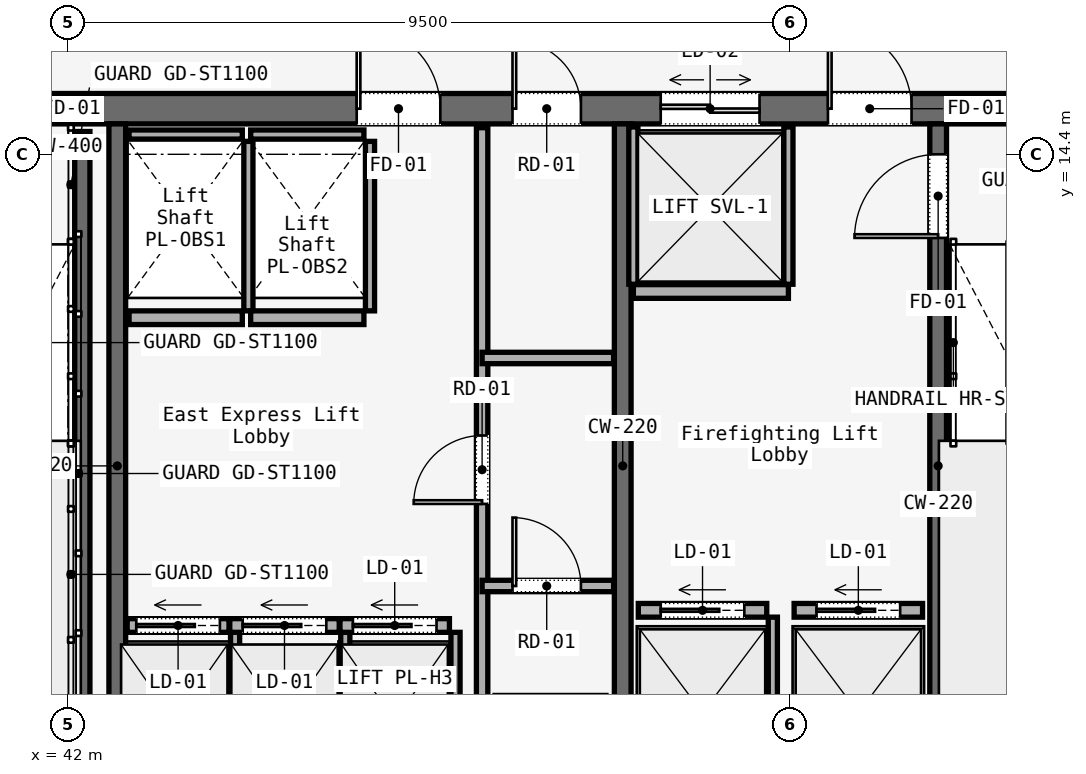
"""IFC4 building model, lengths in metres.
Left out: names, types, materials, properties, quantities, classifications, styles, units other than length and angle.
Written with IfcOpenShell. Run it as: python <this file> out.ifc"""

import sys

from ifc_helpers import new_model, si_unit, direction, frame, frame_2d, origin, place, context, subcontext, project, spatial, rectangle, extrude, element, fill, save


model = new_model("IFC4")
c1 = context("Model", 3, precision=1e-05, world=origin(), true_north=direction((0.0, 1.0)))
c2 = subcontext(c1, "Body", "Model", "MODEL_VIEW")
j1 = project(units=[si_unit("LENGTHUNIT", "METRE"), si_unit("PLANEANGLEUNIT", "RADIAN")], contexts=[c1])
p1 = place(None, origin())
s1 = spatial("IfcSite", under=j1, at=p1, CompositionType="ELEMENT")
p2 = place(p1, origin())
s2 = spatial("IfcBuilding", under=s1, at=p2, CompositionType="ELEMENT")
p3 = place(p2, frame((0.0, 0.0, 290.9)))
s3 = spatial("IfcBuildingStorey", under=s2, at=p3, CompositionType="ELEMENT", Elevation=290.9)
p4 = place(p3, frame((26.45, 15.0, 0.0), z_axis=(0.0, 0.0, 1.0), x_axis=(1.0, 0.0, 0.0)))
e1 = element("IfcWall", 1, at=p4, inside=s3, PredefinedType="SOLIDWALL", context=c2, shape_type="SweptSolid", body=[
    extrude(rectangle(XDim=31.1, YDim=0.4, at=frame_2d((15.55, 0.0))), origin(), (0.0, 0.0, 1.0), 3.58),
])
p5 = place(p4, frame((1.65, 0.0, 0.0)))
e2 = element("IfcOpeningElement", 2, at=p5, cuts=e1, PredefinedType="OPENING", context=c2, shape_type="SweptSolid", body=[
    extrude(rectangle(XDim=1.1, YDim=2.2, at=frame_2d((0.55, 1.1))), frame((0.0, 0.2, 0.0), z_axis=(0.0, -1.0, 0.0), x_axis=(1.0, 0.0, 0.0)), (0.0, 0.0, 1.0), 0.4),
])
p6 = place(p4, frame((13.65, 0.0, 0.0)))
e3 = element("IfcOpeningElement", 3, at=p6, cuts=e1, PredefinedType="OPENING", context=c2, shape_type="SweptSolid", body=[
    extrude(rectangle(XDim=1.1, YDim=2.2, at=frame_2d((0.55, 1.1))), frame((0.0, 0.2, 0.0), z_axis=(0.0, -1.0, 0.0), x_axis=(1.0, 0.0, 0.0)), (0.0, 0.0, 1.0), 0.4),
])
p7 = place(p4, frame((25.55, 0.0, 0.0)))
e4 = element("IfcOpeningElement", 4, at=p7, cuts=e1, PredefinedType="OPENING", context=c2, shape_type="SweptSolid", body=[
    extrude(rectangle(XDim=1.1, YDim=2.2, at=frame_2d((0.55, 1.1))), frame((0.0, 0.2, 0.0), z_axis=(0.0, -1.0, 0.0), x_axis=(1.0, 0.0, 0.0)), (0.0, 0.0, 1.0), 0.4),
])
p8 = place(p4, frame((19.35, 0.0, 0.0)))
e5 = element("IfcOpeningElement", 5, at=p8, cuts=e1, PredefinedType="OPENING", context=c2, shape_type="SweptSolid", body=[
    extrude(rectangle(XDim=1.1, YDim=2.2, at=frame_2d((0.55, 1.1))), frame((0.0, 0.2, 0.0), z_axis=(0.0, -1.0, 0.0), x_axis=(1.0, 0.0, 0.0)), (0.0, 0.0, 1.0), 0.4),
])
p9 = place(p4, frame((21.4, 0.0, 0.0)))
e6 = element("IfcOpeningElement", 6, at=p9, cuts=e1, PredefinedType="OPENING", context=c2, shape_type="SweptSolid", body=[
    extrude(rectangle(XDim=0.9, YDim=2.1, at=frame_2d((0.45, 1.05))), frame((0.0, 0.2, 0.0), z_axis=(0.0, -1.0, 0.0), x_axis=(1.0, 0.0, 0.0)), (0.0, 0.0, 1.0), 0.4),
])
p10 = place(p4, frame((5.54, 0.0, 0.0)))
e7 = element("IfcOpeningElement", 7, at=p10, cuts=e1, PredefinedType="OPENING", context=c2, shape_type="SweptSolid", body=[
    extrude(rectangle(XDim=0.95, YDim=2.2, at=frame_2d((0.475, 1.1))), frame((0.0, 0.2, 0.0), z_axis=(0.0, -1.0, 0.0), x_axis=(1.0, 0.0, 0.0)), (0.0, 0.0, 1.0), 0.4),
])
p11 = place(p4, frame((9.49, 0.0, 0.0)))
e8 = element("IfcOpeningElement", 8, at=p11, cuts=e1, PredefinedType="OPENING", context=c2, shape_type="SweptSolid", body=[
    extrude(rectangle(XDim=0.95, YDim=2.2, at=frame_2d((0.475, 1.1))), frame((0.0, 0.2, 0.0), z_axis=(0.0, -1.0, 0.0), x_axis=(1.0, 0.0, 0.0)), (0.0, 0.0, 1.0), 0.4),
])
p12 = place(p4, frame((23.35, 0.0, 0.0)))
e9 = element("IfcOpeningElement", 9, at=p12, cuts=e1, PredefinedType="OPENING", context=c2, shape_type="SweptSolid", body=[
    extrude(rectangle(XDim=1.3, YDim=2.3, at=frame_2d((0.65, 1.15))), frame((0.0, 0.2, 0.0), z_axis=(0.0, -1.0, 0.0), x_axis=(1.0, 0.0, 0.0)), (0.0, 0.0, 1.0), 0.4),
])
for number, where, z_axis, x_axis in (
    (10, (42.65, 5.8, 0.0), (0.0, 0.0, 1.0), (0.0, 1.0, 0.0)),
    (11, (49.3, 5.8, 0.0), (0.0, 0.0, 1.0), (0.0, 1.0, 0.0)),
):
    element("IfcWall", number, at=place(p3, frame(where, z_axis=z_axis, x_axis=x_axis)), inside=s3, PredefinedType="SOLIDWALL", context=c2, shape_type="SweptSolid", body=[
        extrude(rectangle(XDim=9.0, YDim=0.22, at=frame_2d((4.5, 0.0))), origin(), (0.0, 0.0, 1.0), 3.58),
    ])
p13 = place(p3, frame((53.45, 5.8, 0.0), z_axis=(0.0, 0.0, 1.0), x_axis=(0.0, 1.0, 0.0)))
e12 = element("IfcWall", 12, at=p13, inside=s3, PredefinedType="SOLIDWALL", context=c2, shape_type="SweptSolid", body=[
    extrude(rectangle(XDim=9.0, YDim=0.22, at=frame_2d((4.5, 0.0))), origin(), (0.0, 0.0, 1.0), 3.58),
])
p14 = place(p13, frame((7.5, 0.0, 0.0)))
e13 = element("IfcOpeningElement", 13, at=p14, cuts=e12, PredefinedType="OPENING", context=c2, shape_type="SweptSolid", body=[
    extrude(rectangle(XDim=1.1, YDim=2.2, at=frame_2d((0.55, 1.1))), frame((0.0, 0.11, 0.0), z_axis=(0.0, -1.0, 0.0), x_axis=(1.0, 0.0, 0.0)), (0.0, 0.0, 1.0), 0.22),
])
p15 = place(p3, frame((42.19, 14.7, 0.0), z_axis=(0.0, 0.0, 1.0), x_axis=(0.0, -1.0, 0.0)))
e14 = element("IfcWall", 14, at=p15, inside=s3, PredefinedType="SOLIDWALL", context=c2, shape_type="SweptSolid", body=[
    extrude(rectangle(XDim=7.65, YDim=0.2, at=frame_2d((3.825, 0.0))), origin(), (0.0, 0.0, 1.0), 3.8),
])
p16 = place(p3, frame((47.45, 5.9, 0.0), z_axis=(0.0, 0.0, 1.0), x_axis=(0.0, 1.0, 0.0)))
e15 = element("IfcWall", 15, at=p16, inside=s3, PredefinedType="PARTITIONING", context=c2, shape_type="SweptSolid", body=[
    extrude(rectangle(XDim=8.85, YDim=0.15, at=frame_2d((4.425, 0.0))), origin(), (0.0, 0.0, 1.0), 3.01),
])
p17 = place(p16, frame((3.9, 0.0, 0.0)))
e16 = element("IfcOpeningElement", 16, at=p17, cuts=e15, PredefinedType="OPENING", context=c2, shape_type="SweptSolid", body=[
    extrude(rectangle(XDim=0.9, YDim=2.1, at=frame_2d((0.45, 1.05))), frame((0.0, 0.075, 0.0), z_axis=(0.0, -1.0, 0.0), x_axis=(1.0, 0.0, 0.0)), (0.0, 0.0, 1.0), 0.15),
])
p18 = place(p3, frame((47.45, 8.72, 0.0), z_axis=(0.0, 0.0, 1.0), x_axis=(1.0, 0.0, 0.0)))
e17 = element("IfcWall", 17, at=p18, inside=s3, PredefinedType="PARTITIONING", context=c2, shape_type="SweptSolid", body=[
    extrude(rectangle(XDim=1.73, YDim=0.15, at=frame_2d((0.865, 0.0))), origin(), (0.0, 0.0, 1.0), 3.01),
])
p19 = place(p18, frame((0.4, 0.0, 0.0)))
e18 = element("IfcOpeningElement", 18, at=p19, cuts=e17, PredefinedType="OPENING", context=c2, shape_type="SweptSolid", body=[
    extrude(rectangle(XDim=0.9, YDim=2.1, at=frame_2d((0.45, 1.05))), frame((0.0, 0.075, 0.0), z_axis=(0.0, -1.0, 0.0), x_axis=(1.0, 0.0, 0.0)), (0.0, 0.0, 1.0), 0.15),
])
p20 = place(p3, frame((47.45, 11.72, 0.0), z_axis=(0.0, 0.0, 1.0), x_axis=(1.0, 0.0, 0.0)))
e19 = element("IfcWall", 19, at=p20, inside=s3, PredefinedType="PARTITIONING", context=c2, shape_type="SweptSolid", body=[
    extrude(rectangle(XDim=1.73, YDim=0.15, at=frame_2d((0.865, 0.0))), origin(), (0.0, 0.0, 1.0), 3.01),
])
p21 = place(p3, frame((42.78, 8.2, 0.0), z_axis=(0.0, 0.0, 1.0), x_axis=(1.0, 0.0, 0.0)))
e20 = element("IfcWall", 20, at=p21, inside=s3, PredefinedType="SOLIDWALL", context=c2, shape_type="SweptSolid", body=[
    extrude(rectangle(XDim=1.34, YDim=0.18, at=frame_2d((0.67, 0.0))), origin(), (0.0, 0.0, 1.0), 3.01),
])
p22 = place(p21, frame((0.12, 0.0, 0.0)))
e21 = element("IfcOpeningElement", 21, at=p22, cuts=e20, PredefinedType="OPENING", context=c2, shape_type="SweptSolid", body=[
    extrude(rectangle(XDim=1.1, YDim=2.2, at=frame_2d((0.55, 1.1))), frame((0.0, 0.09, 0.0), z_axis=(0.0, -1.0, 0.0), x_axis=(1.0, 0.0, 0.0)), (0.0, 0.0, 1.0), 0.18),
])
p23 = place(p3, frame((44.2, 5.93, 0.0), z_axis=(0.0, 0.0, 1.0), x_axis=(0.0, 1.0, 0.0)))
e22 = element("IfcWall", 22, at=p23, inside=s3, PredefinedType="SOLIDWALL", context=c2, shape_type="SweptSolid", body=[
    extrude(rectangle(XDim=2.18, YDim=0.12, at=frame_2d((1.09, 0.0))), origin(), (0.0, 0.0, 1.0), 3.01),
])
p24 = place(p3, frame((44.13, 8.2, 0.0), z_axis=(0.0, 0.0, 1.0), x_axis=(1.0, 0.0, 0.0)))
e23 = element("IfcWall", 23, at=p24, inside=s3, PredefinedType="SOLIDWALL", context=c2, shape_type="SweptSolid", body=[
    extrude(rectangle(XDim=1.44, YDim=0.18, at=frame_2d((0.72, 0.0))), origin(), (0.0, 0.0, 1.0), 3.01),
])
p25 = place(p24, frame((0.17, 0.0, 0.0)))
e24 = element("IfcOpeningElement", 24, at=p25, cuts=e23, PredefinedType="OPENING", context=c2, shape_type="SweptSolid", body=[
    extrude(rectangle(XDim=1.1, YDim=2.2, at=frame_2d((0.55, 1.1))), frame((0.0, 0.09, 0.0), z_axis=(0.0, -1.0, 0.0), x_axis=(1.0, 0.0, 0.0)), (0.0, 0.0, 1.0), 0.18),
])
p26 = place(p3, frame((45.65, 5.93, 0.0), z_axis=(0.0, 0.0, 1.0), x_axis=(0.0, 1.0, 0.0)))
e25 = element("IfcWall", 25, at=p26, inside=s3, PredefinedType="SOLIDWALL", context=c2, shape_type="SweptSolid", body=[
    extrude(rectangle(XDim=2.18, YDim=0.12, at=frame_2d((1.09, 0.0))), origin(), (0.0, 0.0, 1.0), 3.01),
])
p27 = place(p3, frame((45.58, 8.2, 0.0), z_axis=(0.0, 0.0, 1.0), x_axis=(1.0, 0.0, 0.0)))
e26 = element("IfcWall", 26, at=p27, inside=s3, PredefinedType="SOLIDWALL", context=c2, shape_type="SweptSolid", body=[
    extrude(rectangle(XDim=1.44, YDim=0.18, at=frame_2d((0.72, 0.0))), origin(), (0.0, 0.0, 1.0), 3.01),
])
p28 = place(p27, frame((0.17, 0.0, 0.0)))
e27 = element("IfcOpeningElement", 27, at=p28, cuts=e26, PredefinedType="OPENING", context=c2, shape_type="SweptSolid", body=[
    extrude(rectangle(XDim=1.1, YDim=2.2, at=frame_2d((0.55, 1.1))), frame((0.0, 0.09, 0.0), z_axis=(0.0, -1.0, 0.0), x_axis=(1.0, 0.0, 0.0)), (0.0, 0.0, 1.0), 0.18),
])
p29 = place(p3, frame((47.1, 5.93, 0.0), z_axis=(0.0, 0.0, 1.0), x_axis=(0.0, 1.0, 0.0)))
e28 = element("IfcWall", 28, at=p29, inside=s3, PredefinedType="SOLIDWALL", context=c2, shape_type="SweptSolid", body=[
    extrude(rectangle(XDim=2.18, YDim=0.12, at=frame_2d((1.09, 0.0))), origin(), (0.0, 0.0, 1.0), 3.01),
])
p30 = place(p3, frame((42.805, 12.25, 0.0), z_axis=(0.0, 0.0, 1.0), x_axis=(1.0, 0.0, 0.0)))
e29 = element("IfcWall", 29, at=p30, inside=s3, PredefinedType="SOLIDWALL", context=c2, shape_type="SweptSolid", body=[
    extrude(rectangle(XDim=1.49, YDim=0.18, at=frame_2d((0.745, 0.0))), origin(), (0.0, 0.0, 1.0), 3.01),
])
p31 = place(p3, frame((42.805, 14.66, 0.0), z_axis=(0.0, 0.0, 1.0), x_axis=(1.0, 0.0, 0.0)))
e30 = element("IfcWall", 30, at=p31, inside=s3, PredefinedType="SOLIDWALL", context=c2, shape_type="SweptSolid", body=[
    extrude(rectangle(XDim=1.49, YDim=0.12, at=frame_2d((0.745, 0.0))), origin(), (0.0, 0.0, 1.0), 3.01),
])
p32 = place(p3, frame((44.375, 12.34, 0.0), z_axis=(0.0, 0.0, 1.0), x_axis=(0.0, 1.0, 0.0)))
e31 = element("IfcWall", 31, at=p32, inside=s3, PredefinedType="SOLIDWALL", context=c2, shape_type="SweptSolid", body=[
    extrude(rectangle(XDim=2.23, YDim=0.12, at=frame_2d((1.115, 0.0))), origin(), (0.0, 0.0, 1.0), 3.01),
])
p33 = place(p3, frame((44.405, 12.25, 0.0), z_axis=(0.0, 0.0, 1.0), x_axis=(1.0, 0.0, 0.0)))
e32 = element("IfcWall", 32, at=p33, inside=s3, PredefinedType="SOLIDWALL", context=c2, shape_type="SweptSolid", body=[
    extrude(rectangle(XDim=1.49, YDim=0.18, at=frame_2d((0.745, 0.0))), origin(), (0.0, 0.0, 1.0), 3.01),
])
p34 = place(p3, frame((44.405, 14.66, 0.0), z_axis=(0.0, 0.0, 1.0), x_axis=(1.0, 0.0, 0.0)))
e33 = element("IfcWall", 33, at=p34, inside=s3, PredefinedType="SOLIDWALL", context=c2, shape_type="SweptSolid", body=[
    extrude(rectangle(XDim=1.49, YDim=0.12, at=frame_2d((0.745, 0.0))), origin(), (0.0, 0.0, 1.0), 3.01),
])
p35 = place(p3, frame((45.975, 12.34, 0.0), z_axis=(0.0, 0.0, 1.0), x_axis=(0.0, 1.0, 0.0)))
e34 = element("IfcWall", 34, at=p35, inside=s3, PredefinedType="SOLIDWALL", context=c2, shape_type="SweptSolid", body=[
    extrude(rectangle(XDim=2.23, YDim=0.12, at=frame_2d((1.115, 0.0))), origin(), (0.0, 0.0, 1.0), 3.01),
])
p36 = place(p3, frame((49.505, 8.4, 0.0), z_axis=(0.0, 0.0, 1.0), x_axis=(1.0, 0.0, 0.0)))
e35 = element("IfcWall", 35, at=p36, inside=s3, PredefinedType="SOLIDWALL", context=c2, shape_type="SweptSolid", body=[
    extrude(rectangle(XDim=1.69, YDim=0.18, at=frame_2d((0.845, 0.0))), origin(), (0.0, 0.0, 1.0), 3.01),
])
p37 = place(p36, frame((0.295, 0.0, 0.0)))
e36 = element("IfcOpeningElement", 36, at=p37, cuts=e35, PredefinedType="OPENING", context=c2, shape_type="SweptSolid", body=[
    extrude(rectangle(XDim=1.1, YDim=2.2, at=frame_2d((0.55, 1.1))), frame((0.0, 0.09, 0.0), z_axis=(0.0, -1.0, 0.0), x_axis=(1.0, 0.0, 0.0)), (0.0, 0.0, 1.0), 0.18),
])
p38 = place(p3, frame((51.275, 5.93, 0.0), z_axis=(0.0, 0.0, 1.0), x_axis=(0.0, 1.0, 0.0)))
e37 = element("IfcWall", 37, at=p38, inside=s3, PredefinedType="SOLIDWALL", context=c2, shape_type="SweptSolid", body=[
    extrude(rectangle(XDim=2.38, YDim=0.12, at=frame_2d((1.19, 0.0))), origin(), (0.0, 0.0, 1.0), 3.01),
])
p39 = place(p3, frame((51.555, 8.4, 0.0), z_axis=(0.0, 0.0, 1.0), x_axis=(1.0, 0.0, 0.0)))
e38 = element("IfcWall", 38, at=p39, inside=s3, PredefinedType="SOLIDWALL", context=c2, shape_type="SweptSolid", body=[
    extrude(rectangle(XDim=1.69, YDim=0.18, at=frame_2d((0.845, 0.0))), origin(), (0.0, 0.0, 1.0), 3.01),
])
p40 = place(p39, frame((0.295, 0.0, 0.0)))
e39 = element("IfcOpeningElement", 39, at=p40, cuts=e38, PredefinedType="OPENING", context=c2, shape_type="SweptSolid", body=[
    extrude(rectangle(XDim=1.1, YDim=2.2, at=frame_2d((0.55, 1.1))), frame((0.0, 0.09, 0.0), z_axis=(0.0, -1.0, 0.0), x_axis=(1.0, 0.0, 0.0)), (0.0, 0.0, 1.0), 0.18),
])
p41 = place(p3, frame((49.44, 12.595, 0.0), z_axis=(0.0, 0.0, 1.0), x_axis=(1.0, 0.0, 0.0)))
e40 = element("IfcWall", 40, at=p41, inside=s3, PredefinedType="SOLIDWALL", context=c2, shape_type="SweptSolid", body=[
    extrude(rectangle(XDim=2.04, YDim=0.18, at=frame_2d((1.02, 0.0))), origin(), (0.0, 0.0, 1.0), 3.01),
])
for number, where, z_axis, x_axis in (
    (41, (49.44, 12.69, 0.0), (0.0, 0.0, 1.0), (0.0, 1.0, 0.0)),
    (42, (51.48, 12.69, 0.0), (0.0, 0.0, 1.0), (0.0, 1.0, 0.0)),
):
    element("IfcWall", number, at=place(p3, frame(where, z_axis=z_axis, x_axis=x_axis)), inside=s3, PredefinedType="SOLIDWALL", context=c2, shape_type="SweptSolid", body=[
        extrude(rectangle(XDim=2.07, YDim=0.12, at=frame_2d((1.035, 0.0))), origin(), (0.0, 0.0, 1.0), 3.01),
    ])
p42 = place(p7, origin())
e43 = element("IfcDoor", 43, at=p42, inside=s3, OperationType="SINGLE_SWING_RIGHT", PredefinedType="DOOR", context=c2, shape_type="SweptSolid", body=[
    extrude(rectangle(XDim=1.1, YDim=2.2, at=frame_2d((0.55, 1.1))), frame((0.0, 0.025, 0.0), z_axis=(0.0, -1.0, 0.0), x_axis=(1.0, 0.0, 0.0)), (0.0, 0.0, 1.0), 0.05),
])
fill(e4, e43)
p43 = place(p8, origin())
e44 = element("IfcDoor", 44, at=p43, inside=s3, OperationType="SINGLE_SWING_LEFT", PredefinedType="DOOR", context=c2, shape_type="SweptSolid", body=[
    extrude(rectangle(XDim=1.1, YDim=2.2, at=frame_2d((0.55, 1.1))), frame((0.0, 0.025, 0.0), z_axis=(0.0, -1.0, 0.0), x_axis=(1.0, 0.0, 0.0)), (0.0, 0.0, 1.0), 0.05),
])
fill(e5, e44)
p44 = place(p9, origin())
e45 = element("IfcDoor", 45, at=p44, inside=s3, OperationType="SINGLE_SWING_LEFT", PredefinedType="DOOR", context=c2, shape_type="SweptSolid", body=[
    extrude(rectangle(XDim=0.9, YDim=2.1, at=frame_2d((0.45, 1.05))), frame((0.0, 0.025, 0.0), z_axis=(0.0, -1.0, 0.0), x_axis=(1.0, 0.0, 0.0)), (0.0, 0.0, 1.0), 0.05),
])
fill(e6, e45)
p45 = place(p14, origin())
e46 = element("IfcDoor", 46, at=p45, inside=s3, OperationType="SINGLE_SWING_LEFT", PredefinedType="DOOR", context=c2, shape_type="SweptSolid", body=[
    extrude(rectangle(XDim=1.1, YDim=2.2, at=frame_2d((0.55, 1.1))), frame((0.0, 0.025, 0.0), z_axis=(0.0, -1.0, 0.0), x_axis=(1.0, 0.0, 0.0)), (0.0, 0.0, 1.0), 0.05),
])
fill(e13, e46)
p46 = place(p17, origin())
e47 = element("IfcDoor", 47, at=p46, inside=s3, OperationType="SINGLE_SWING_LEFT", PredefinedType="DOOR", context=c2, shape_type="SweptSolid", body=[
    extrude(rectangle(XDim=0.9, YDim=2.1, at=frame_2d((0.45, 1.05))), frame((0.0, 0.025, 0.0), z_axis=(0.0, -1.0, 0.0), x_axis=(1.0, 0.0, 0.0)), (0.0, 0.0, 1.0), 0.05),
])
fill(e16, e47)
p47 = place(p19, origin())
e48 = element("IfcDoor", 48, at=p47, inside=s3, OperationType="SINGLE_SWING_RIGHT", PredefinedType="DOOR", context=c2, shape_type="SweptSolid", body=[
    extrude(rectangle(XDim=0.9, YDim=2.1, at=frame_2d((0.45, 1.05))), frame((0.0, 0.025, 0.0), z_axis=(0.0, -1.0, 0.0), x_axis=(1.0, 0.0, 0.0)), (0.0, 0.0, 1.0), 0.05),
])
fill(e18, e48)
p48 = place(p22, origin())
e49 = element("IfcDoor", 49, at=p48, inside=s3, OperationType="SLIDING_TO_LEFT", PredefinedType="DOOR", context=c2, shape_type="SweptSolid", body=[
    extrude(rectangle(XDim=1.1, YDim=2.2, at=frame_2d((0.55, 1.1))), frame((0.0, 0.025, 0.0), z_axis=(0.0, -1.0, 0.0), x_axis=(1.0, 0.0, 0.0)), (0.0, 0.0, 1.0), 0.05),
])
fill(e21, e49)
p49 = place(p25, origin())
e50 = element("IfcDoor", 50, at=p49, inside=s3, OperationType="SLIDING_TO_LEFT", PredefinedType="DOOR", context=c2, shape_type="SweptSolid", body=[
    extrude(rectangle(XDim=1.1, YDim=2.2, at=frame_2d((0.55, 1.1))), frame((0.0, 0.025, 0.0), z_axis=(0.0, -1.0, 0.0), x_axis=(1.0, 0.0, 0.0)), (0.0, 0.0, 1.0), 0.05),
])
fill(e24, e50)
p50 = place(p28, origin())
e51 = element("IfcDoor", 51, at=p50, inside=s3, OperationType="SLIDING_TO_LEFT", PredefinedType="DOOR", context=c2, shape_type="SweptSolid", body=[
    extrude(rectangle(XDim=1.1, YDim=2.2, at=frame_2d((0.55, 1.1))), frame((0.0, 0.025, 0.0), z_axis=(0.0, -1.0, 0.0), x_axis=(1.0, 0.0, 0.0)), (0.0, 0.0, 1.0), 0.05),
])
fill(e27, e51)
p51 = place(p37, origin())
e52 = element("IfcDoor", 52, at=p51, inside=s3, OperationType="SLIDING_TO_LEFT", PredefinedType="DOOR", context=c2, shape_type="SweptSolid", body=[
    extrude(rectangle(XDim=1.1, YDim=2.2, at=frame_2d((0.55, 1.1))), frame((0.0, 0.025, 0.0), z_axis=(0.0, -1.0, 0.0), x_axis=(1.0, 0.0, 0.0)), (0.0, 0.0, 1.0), 0.05),
])
fill(e36, e52)
p52 = place(p40, origin())
e53 = element("IfcDoor", 53, at=p52, inside=s3, OperationType="SLIDING_TO_LEFT", PredefinedType="DOOR", context=c2, shape_type="SweptSolid", body=[
    extrude(rectangle(XDim=1.1, YDim=2.2, at=frame_2d((0.55, 1.1))), frame((0.0, 0.025, 0.0), z_axis=(0.0, -1.0, 0.0), x_axis=(1.0, 0.0, 0.0)), (0.0, 0.0, 1.0), 0.05),
])
fill(e39, e53)
p53 = place(p12, origin())
e54 = element("IfcDoor", 54, at=p53, inside=s3, OperationType="DOUBLE_DOOR_SLIDING", PredefinedType="DOOR", context=c2, shape_type="SweptSolid", body=[
    extrude(rectangle(XDim=1.3, YDim=2.3, at=frame_2d((0.65, 1.15))), frame((0.0, 0.025, 0.0), z_axis=(0.0, -1.0, 0.0), x_axis=(1.0, 0.0, 0.0)), (0.0, 0.0, 1.0), 0.05),
])
fill(e9, e54)
save(model, sys.argv[1])
